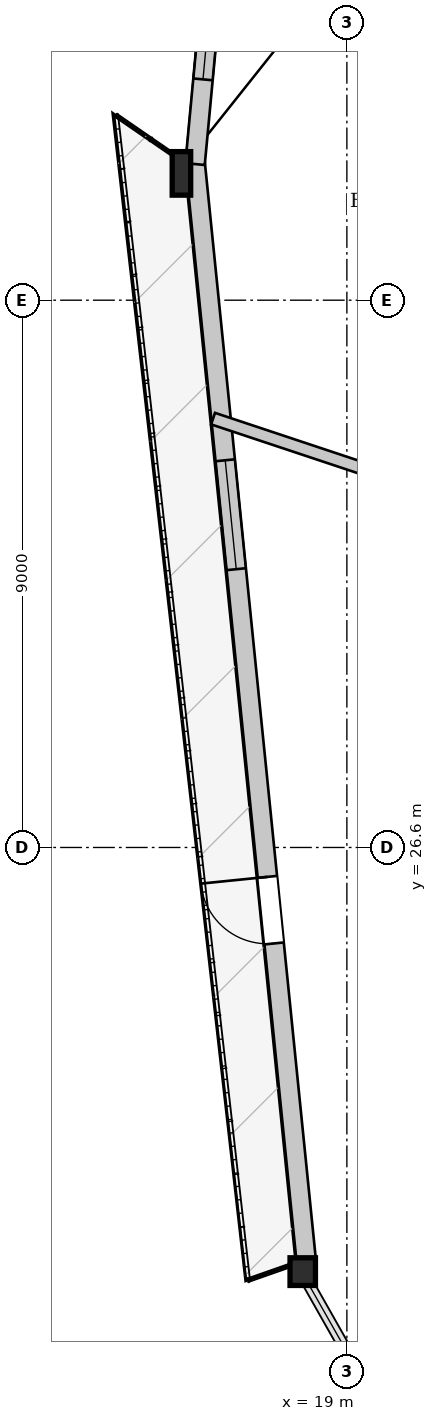
"""IFC4 building model, lengths in metres.
Left out: names, types, materials, properties, quantities, classifications, styles, units other than length and angle.
Written with IfcOpenShell. Run it as: python <this file> out.ifc"""

import sys

from ifc_helpers import new_model, si_unit, direction, frame, frame_2d, origin, origin_2d, place, context, subcontext, project, spatial, rectangle, i_section, extrude, source, transform, mapped, element, fill, save


model = new_model("IFC4")
c1 = context("Model", 3, precision=1e-05, world=origin(), true_north=direction((0.0, 1.0)))
c2 = subcontext(c1, "Body", "Model", "MODEL_VIEW")
j1 = project(units=[si_unit("LENGTHUNIT", "METRE"), si_unit("PLANEANGLEUNIT", "RADIAN")], contexts=[c1])
p1 = place(None, origin())
s1 = spatial("IfcSite", under=j1, at=p1, CompositionType="ELEMENT")
p2 = place(p1, origin())
s2 = spatial("IfcBuilding", under=s1, at=p2, CompositionType="ELEMENT")
p3 = place(p2, frame((0.0, 0.0, 112.8)))
s3 = spatial("IfcBuildingStorey", under=s2, at=p3, CompositionType="ELEMENT", Elevation=112.8)
m1 = source(origin(), c2, "Body", "SweptSolid", [
    extrude(i_section(OverallWidth=0.304, OverallDepth=0.716, WebThickness=0.021, FlangeThickness=0.04, at=origin_2d()), origin(), (0.0, 0.0, 1.0), 3.404),
])
p4 = place(p3, frame((16.344, 37.854, 0.0), z_axis=(-0.038083007861, -0.098685911143, 0.994389649712), x_axis=(0.9329431075, -0.360023830002, 0.0)))
e1 = element("IfcColumn", 1, at=p4, inside=s3, PredefinedType="COLUMN", context=c2, shape_type="MappedRepresentation", body=[
    mapped(m1, transform((0.0, 0.0, 0.0), x_axis=(1.0, 0.0, 0.0), y_axis=(0.0, 1.0, 0.0), z_axis=(0.0, 0.0, 1.0), scale=1.0)),
])
m2 = source(origin(), c2, "Body", "SweptSolid", [
    extrude(i_section(OverallWidth=0.418, OverallDepth=0.455, WebThickness=0.038, FlangeThickness=0.059, at=origin_2d()), origin(), (0.0, 0.0, 1.0), 3.402),
])
p5 = place(p3, frame((18.175, 19.764, 0.0), z_axis=(0.058410255518, -0.082090088836, 0.994911784715), x_axis=(0.8147908412, 0.579755021623, 0.0)))
e2 = element("IfcColumn", 2, at=p5, inside=s3, PredefinedType="COLUMN", context=c2, shape_type="MappedRepresentation", body=[
    mapped(m2, transform((0.0, 0.0, 0.0), x_axis=(1.0, 0.0, 0.0), y_axis=(0.0, 1.0, 0.0), z_axis=(0.0, 0.0, 1.0), scale=1.0)),
])
p6 = place(p3, frame((18.334, 19.781, 0.0), z_axis=(0.0, 0.0, 1.0), x_axis=(-0.1006962092, 0.994917219397, 0.0)))
e3 = element("IfcWall", 3, at=p6, inside=s3, PredefinedType="SOLIDWALL", context=c2, shape_type="SweptSolid", body=[
    extrude(rectangle(XDim=18.182, YDim=0.32, at=frame_2d((9.091, 0.0))), origin(), (0.0, 0.0, 1.0), 2.692),
])
p7 = place(p6, frame((5.268, 0.0, 0.0)))
e4 = element("IfcOpeningElement", 4, at=p7, cuts=e3, PredefinedType="OPENING", context=c2, shape_type="SweptSolid", body=[
    extrude(rectangle(XDim=1.1, YDim=2.3, at=frame_2d((0.55, 1.15))), frame((0.0, 0.17, 0.0), z_axis=(0.0, -1.0, 0.0), x_axis=(1.0, 0.0, 0.0)), (0.0, 0.0, 1.0), 0.34),
])
p8 = place(p6, frame((11.454, 0.0, 0.372)))
e5 = element("IfcOpeningElement", 5, at=p8, cuts=e3, PredefinedType="OPENING", context=c2, shape_type="SweptSolid", body=[
    extrude(rectangle(XDim=1.8, YDim=2.2, at=frame_2d((0.9, 1.1))), frame((0.0, 0.17, 0.0), z_axis=(0.0, -1.0, 0.0), x_axis=(1.0, 0.0, 0.0)), (0.0, 0.0, 1.0), 0.34),
])
p9 = place(p3, frame((16.503, 37.839, 0.0), z_axis=(0.0, 0.0, 1.0), x_axis=(0.093173512917, 0.995649886502, 0.0)))
e6 = element("IfcWall", 6, at=p9, inside=s3, PredefinedType="SOLIDWALL", context=c2, shape_type="SweptSolid", body=[
    extrude(rectangle(XDim=4.297, YDim=0.32, at=frame_2d((2.149, 0.0))), origin(), (0.0, 0.0, 1.0), 2.692),
])
p10 = place(p9, frame((1.399, 0.0, 0.272)))
e7 = element("IfcOpeningElement", 7, at=p10, cuts=e6, PredefinedType="OPENING", context=c2, shape_type="SweptSolid", body=[
    extrude(rectangle(XDim=1.5, YDim=2.3, at=frame_2d((0.75, 1.15))), frame((0.0, 0.17, 0.0), z_axis=(0.0, -1.0, 0.0), x_axis=(1.0, 0.0, 0.0)), (0.0, 0.0, 1.0), 0.34),
])
p11 = place(p3, frame((27.45, 30.11, 0.0), z_axis=(0.0, 0.0, 1.0), x_axis=(-0.948876702019, 0.315646961598, 0.0)))
e8 = element("IfcWall", 8, at=p11, inside=s3, PredefinedType="PARTITIONING", context=c2, shape_type="SweptSolid", body=[
    extrude(rectangle(XDim=11.224, YDim=0.2, at=frame_2d((5.612, 0.0))), origin(), (0.0, 0.0, 1.0), 3.3),
])
m3 = source(origin(), c2, "Body", "SweptSolid", [
    extrude(rectangle(XDim=1.1, YDim=2.3, at=frame_2d((0.55, 1.15))), frame((0.0, 0.025, 0.0), z_axis=(0.0, -1.0, 0.0), x_axis=(1.0, 0.0, 0.0)), (0.0, 0.0, 1.0), 0.05),
])
p12 = place(p7, origin())
e9 = element("IfcDoor", 9, at=p12, inside=s3, OperationType="SINGLE_SWING_RIGHT", PredefinedType="DOOR", context=c2, shape_type="MappedRepresentation", body=[
    mapped(m3, transform((0.0, 0.0, 0.0), x_axis=(1.0, 0.0, 0.0), y_axis=(0.0, 1.0, 0.0), z_axis=(0.0, 0.0, 1.0), scale=1.0)),
])
fill(e4, e9)
m4 = source(origin(), c2, "Body", "SweptSolid", [
    extrude(rectangle(XDim=1.8, YDim=2.2, at=frame_2d((0.9, 1.1))), frame((0.0, 0.03, 0.0), z_axis=(0.0, -1.0, 0.0), x_axis=(1.0, 0.0, 0.0)), (0.0, 0.0, 1.0), 0.06),
])
p13 = place(p8, origin())
e10 = element("IfcWindow", 10, at=p13, inside=s3, PartitioningType="SINGLE_PANEL", PredefinedType="WINDOW", context=c2, shape_type="MappedRepresentation", body=[
    mapped(m4, transform((0.0, 0.0, 0.0), x_axis=(1.0, 0.0, 0.0), y_axis=(0.0, 1.0, 0.0), z_axis=(0.0, 0.0, 1.0), scale=1.0)),
])
fill(e5, e10)
m5 = source(origin(), c2, "Body", "SweptSolid", [
    extrude(rectangle(XDim=1.5, YDim=2.3, at=frame_2d((0.75, 1.15))), frame((0.0, 0.03, 0.0), z_axis=(0.0, -1.0, 0.0), x_axis=(1.0, 0.0, 0.0)), (0.0, 0.0, 1.0), 0.06),
])
p14 = place(p10, origin())
e11 = element("IfcWindow", 11, at=p14, inside=s3, PartitioningType="SINGLE_PANEL", PredefinedType="WINDOW", context=c2, shape_type="MappedRepresentation", body=[
    mapped(m5, transform((0.0, 0.0, 0.0), x_axis=(1.0, 0.0, 0.0), y_axis=(0.0, 1.0, 0.0), z_axis=(0.0, 0.0, 1.0), scale=1.0)),
])
fill(e7, e11)
save(model, sys.argv[1])
